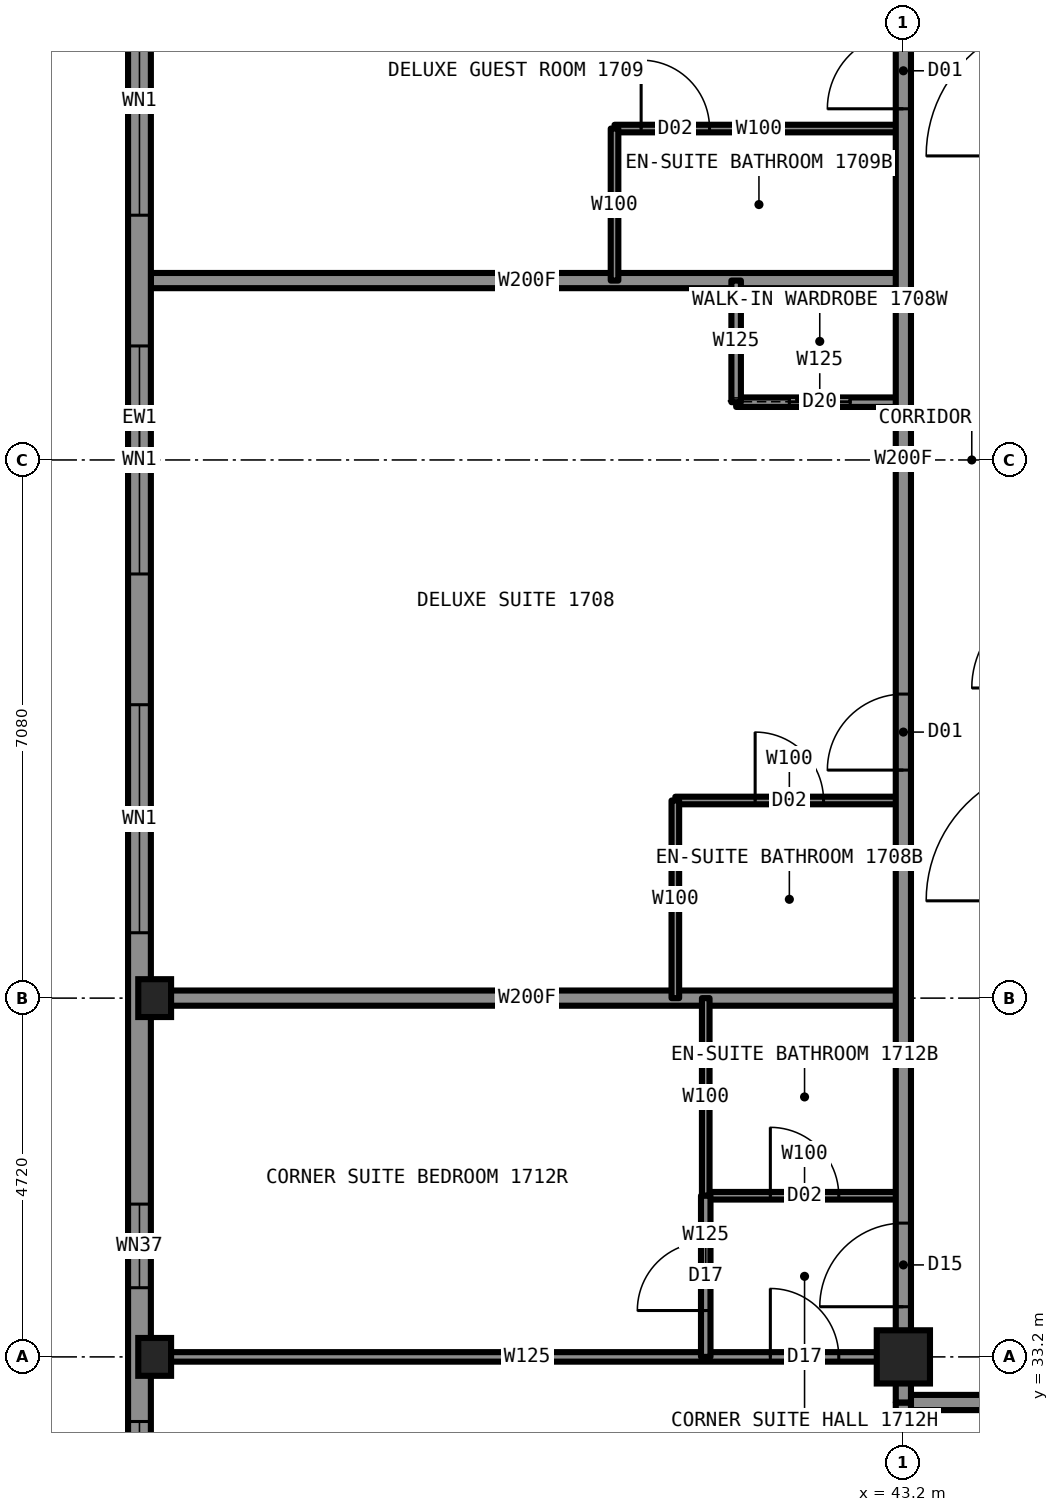
"""IFC4 building model, lengths in metres.
Left out: names, types, materials, properties, quantities, classifications, styles, units other than length and angle.
Written with IfcOpenShell. Run it as: python <this file> out.ifc"""

import sys

from ifc_helpers import new_model, si_unit, direction, frame, frame_2d, origin, origin_2d, place, context, subcontext, project, spatial, rectangle, hollow_rectangle, i_section, extrude, element, fill, save


model = new_model("IFC4")
c1 = context("Model", 3, precision=1e-05, world=origin(), true_north=direction((0.0, 1.0)))
c2 = subcontext(c1, "Body", "Model", "MODEL_VIEW")
j1 = project(units=[si_unit("LENGTHUNIT", "METRE"), si_unit("PLANEANGLEUNIT", "RADIAN")], contexts=[c1])
p1 = place(None, origin())
s1 = spatial("IfcSite", under=j1, at=p1, CompositionType="ELEMENT")
p2 = place(p1, origin())
s2 = spatial("IfcBuilding", under=s1, at=p2, CompositionType="ELEMENT")
p3 = place(p2, frame((0.0, 0.0, 60.0)))
s3 = spatial("IfcBuildingStorey", under=s2, at=p3, CompositionType="ELEMENT", Elevation=60.0)
for number, where, z_axis, x_axis in (
    (1, (33.35, 33.2, 0.0), (0.0, 0.0, 1.0), (1.0, 0.0, 0.0)),
    (2, (33.35, 37.92, 0.0), (0.0, 0.0, 1.0), (1.0, 0.0, 0.0)),
):
    element("IfcColumn", number, at=place(p3, frame(where, z_axis=z_axis, x_axis=x_axis)), inside=s3, PredefinedType="COLUMN", context=c2, shape_type="SweptSolid", body=[
        extrude(i_section(OverallWidth=0.432, OverallDepth=0.498, WebThickness=0.056, FlangeThickness=0.089, at=origin_2d()), origin(), (0.0, 0.0, 1.0), 3.5),
    ])
p4 = place(p3, frame((43.2, 33.2, 0.0), z_axis=(0.0, 0.0, 1.0), x_axis=(1.0, 0.0, 0.0)))
e3 = element("IfcColumn", 3, at=p4, inside=s3, PredefinedType="COLUMN", context=c2, shape_type="SweptSolid", body=[
    extrude(hollow_rectangle(XDim=0.7, YDim=0.7, WallThickness=0.06, at=origin_2d()), origin(), (0.0, 0.0, 1.0), 3.5),
])
p5 = place(p3, frame((33.3, 33.2, 0.0), z_axis=(0.0, 0.0, 1.0), x_axis=(1.0, 0.0, 0.0)))
e4 = element("IfcWall", 4, at=p5, inside=s3, PredefinedType="PARTITIONING", context=c2, shape_type="SweptSolid", body=[
    extrude(rectangle(XDim=9.9, YDim=0.125, at=frame_2d((4.95, 0.0))), origin(), (0.0, 0.0, 1.0), 2.573),
])
p6 = place(p5, frame((8.15, 0.0, 0.0)))
e5 = element("IfcOpeningElement", 5, at=p6, cuts=e4, PredefinedType="OPENING", context=c2, shape_type="SweptSolid", body=[
    extrude(rectangle(XDim=0.9, YDim=2.2, at=frame_2d((0.45, 1.1))), frame((0.0, 0.073, 0.0), z_axis=(0.0, -1.0, 0.0), x_axis=(1.0, 0.0, 0.0)), (0.0, 0.0, 1.0), 0.145),
])
p7 = place(p3, frame((43.2, 32.6, 0.0), z_axis=(0.0, 0.0, 1.0), x_axis=(1.0, 0.0, 0.0)))
e6 = element("IfcWall", 6, at=p7, inside=s3, PredefinedType="PARTITIONING", context=c2, shape_type="SweptSolid", body=[
    extrude(rectangle(XDim=23.6, YDim=0.2, at=frame_2d((11.8, 0.0))), origin(), (0.0, 0.0, 1.0), 3.33),
])
p8 = place(p7, frame((3.0, 0.0, 0.0)))
e7 = element("IfcOpeningElement", 7, at=p8, cuts=e6, PredefinedType="OPENING", context=c2, shape_type="SweptSolid", body=[
    extrude(rectangle(XDim=1.0, YDim=2.2, at=frame_2d((0.5, 1.1))), frame((0.0, 0.11, 0.0), z_axis=(0.0, -1.0, 0.0), x_axis=(1.0, 0.0, 0.0)), (0.0, 0.0, 1.0), 0.22),
])
p9 = place(p7, frame((12.44, 0.0, 0.0)))
e8 = element("IfcOpeningElement", 8, at=p9, cuts=e6, PredefinedType="OPENING", context=c2, shape_type="SweptSolid", body=[
    extrude(rectangle(XDim=1.0, YDim=2.2, at=frame_2d((0.5, 1.1))), frame((0.0, 0.11, 0.0), z_axis=(0.0, -1.0, 0.0), x_axis=(1.0, 0.0, 0.0)), (0.0, 0.0, 1.0), 0.22),
])
p10 = place(p7, frame((20.34, 0.0, 0.0)))
e9 = element("IfcOpeningElement", 9, at=p10, cuts=e6, PredefinedType="OPENING", context=c2, shape_type="SweptSolid", body=[
    extrude(rectangle(XDim=1.0, YDim=2.2, at=frame_2d((0.5, 1.1))), frame((0.0, 0.11, 0.0), z_axis=(0.0, -1.0, 0.0), x_axis=(1.0, 0.0, 0.0)), (0.0, 0.0, 1.0), 0.22),
])
p11 = place(p3, frame((40.2, 40.52, 0.0), z_axis=(0.0, 0.0, 1.0), x_axis=(1.0, 0.0, 0.0)))
e10 = element("IfcWall", 10, at=p11, inside=s3, PredefinedType="PARTITIONING", context=c2, shape_type="SweptSolid", body=[
    extrude(rectangle(XDim=3.0, YDim=0.1, at=frame_2d((1.5, 0.0))), origin(), (0.0, 0.0, 1.0), 3.33),
])
p12 = place(p11, frame((1.05, 0.0, 0.0)))
e11 = element("IfcOpeningElement", 11, at=p12, cuts=e10, PredefinedType="OPENING", context=c2, shape_type="SweptSolid", body=[
    extrude(rectangle(XDim=0.9, YDim=2.1, at=frame_2d((0.45, 1.05))), frame((0.0, 0.06, 0.0), z_axis=(0.0, -1.0, 0.0), x_axis=(1.0, 0.0, 0.0)), (0.0, 0.0, 1.0), 0.12),
])
p13 = place(p3, frame((33.3, 37.92, 0.0), z_axis=(0.0, 0.0, 1.0), x_axis=(1.0, 0.0, 0.0)))
e12 = element("IfcWall", 12, at=p13, inside=s3, PredefinedType="PARTITIONING", context=c2, shape_type="SweptSolid", body=[
    extrude(rectangle(XDim=9.9, YDim=0.2, at=frame_2d((4.95, 0.0))), origin(), (0.0, 0.0, 1.0), 2.573),
])
p14 = place(p3, frame((40.6, 35.32, 0.0), z_axis=(0.0, 0.0, 1.0), x_axis=(1.0, 0.0, 0.0)))
e13 = element("IfcWall", 13, at=p14, inside=s3, PredefinedType="PARTITIONING", context=c2, shape_type="SweptSolid", body=[
    extrude(rectangle(XDim=2.6, YDim=0.1, at=frame_2d((1.3, 0.0))), origin(), (0.0, 0.0, 1.0), 3.33),
])
p15 = place(p14, frame((0.85, 0.0, 0.0)))
e14 = element("IfcOpeningElement", 14, at=p15, cuts=e13, PredefinedType="OPENING", context=c2, shape_type="SweptSolid", body=[
    extrude(rectangle(XDim=0.9, YDim=2.1, at=frame_2d((0.45, 1.05))), frame((0.0, 0.06, 0.0), z_axis=(0.0, -1.0, 0.0), x_axis=(1.0, 0.0, 0.0)), (0.0, 0.0, 1.0), 0.12),
])
p16 = place(p3, frame((41.0, 45.76, 0.0), z_axis=(0.0, 0.0, 1.0), x_axis=(1.0, 0.0, 0.0)))
e15 = element("IfcWall", 15, at=p16, inside=s3, PredefinedType="PARTITIONING", context=c2, shape_type="SweptSolid", body=[
    extrude(rectangle(XDim=2.2, YDim=0.125, at=frame_2d((1.1, 0.0))), origin(), (0.0, 0.0, 1.0), 3.33),
])
p17 = place(p16, frame((0.7, 0.0, 0.0)))
e16 = element("IfcOpeningElement", 16, at=p17, cuts=e15, PredefinedType="OPENING", context=c2, shape_type="SweptSolid", body=[
    extrude(rectangle(XDim=0.8, YDim=2.1, at=frame_2d((0.4, 1.05))), frame((0.0, 0.073, 0.0), z_axis=(0.0, -1.0, 0.0), x_axis=(1.0, 0.0, 0.0)), (0.0, 0.0, 1.0), 0.145),
])
p18 = place(p3, frame((33.3, 47.36, 0.0), z_axis=(0.0, 0.0, 1.0), x_axis=(1.0, 0.0, 0.0)))
e17 = element("IfcWall", 17, at=p18, inside=s3, PredefinedType="PARTITIONING", context=c2, shape_type="SweptSolid", body=[
    extrude(rectangle(XDim=9.9, YDim=0.2, at=frame_2d((4.95, 0.0))), origin(), (0.0, 0.0, 1.0), 2.723),
])
p19 = place(p3, frame((39.4, 49.36, 0.0), z_axis=(0.0, 0.0, 1.0), x_axis=(1.0, 0.0, 0.0)))
e18 = element("IfcWall", 18, at=p19, inside=s3, PredefinedType="PARTITIONING", context=c2, shape_type="SweptSolid", body=[
    extrude(rectangle(XDim=3.8, YDim=0.1, at=frame_2d((1.9, 0.0))), origin(), (0.0, 0.0, 1.0), 3.33),
])
p20 = place(p19, frame((0.35, 0.0, 0.0)))
e19 = element("IfcOpeningElement", 19, at=p20, cuts=e18, PredefinedType="OPENING", context=c2, shape_type="SweptSolid", body=[
    extrude(rectangle(XDim=0.9, YDim=2.1, at=frame_2d((0.45, 1.05))), frame((0.0, 0.06, 0.0), z_axis=(0.0, -1.0, 0.0), x_axis=(1.0, 0.0, 0.0)), (0.0, 0.0, 1.0), 0.12),
])
p21 = place(p3, frame((43.2, 33.22, 0.0), z_axis=(0.0, 0.0, 1.0), x_axis=(0.0, 1.0, 0.0)))
e20 = element("IfcWall", 20, at=p21, inside=s3, PredefinedType="PARTITIONING", context=c2, shape_type="SweptSolid", body=[
    extrude(rectangle(XDim=23.58, YDim=0.2, at=frame_2d((11.79, 0.0))), origin(), (0.0, 0.0, 1.0), 3.33),
])
p22 = place(p21, frame((7.7, 0.0, 0.0)))
e21 = element("IfcOpeningElement", 21, at=p22, cuts=e20, PredefinedType="OPENING", context=c2, shape_type="SweptSolid", body=[
    extrude(rectangle(XDim=1.0, YDim=2.2, at=frame_2d((0.5, 1.1))), frame((0.0, 0.11, 0.0), z_axis=(0.0, -1.0, 0.0), x_axis=(1.0, 0.0, 0.0)), (0.0, 0.0, 1.0), 0.22),
])
p23 = place(p21, frame((16.4, 0.0, 0.0)))
e22 = element("IfcOpeningElement", 22, at=p23, cuts=e20, PredefinedType="OPENING", context=c2, shape_type="SweptSolid", body=[
    extrude(rectangle(XDim=1.0, YDim=2.2, at=frame_2d((0.5, 1.1))), frame((0.0, 0.11, 0.0), z_axis=(0.0, -1.0, 0.0), x_axis=(1.0, 0.0, 0.0)), (0.0, 0.0, 1.0), 0.22),
])
p24 = place(p21, frame((21.82, 0.0, 0.0)))
e23 = element("IfcOpeningElement", 23, at=p24, cuts=e20, PredefinedType="OPENING", context=c2, shape_type="SweptSolid", body=[
    extrude(rectangle(XDim=1.1, YDim=2.2, at=frame_2d((0.55, 1.1))), frame((0.0, 0.11, 0.0), z_axis=(0.0, -1.0, 0.0), x_axis=(1.0, 0.0, 0.0)), (0.0, 0.0, 1.0), 0.22),
])
p25 = place(p21, frame((0.64, 0.0, 0.0)))
e24 = element("IfcOpeningElement", 24, at=p25, cuts=e20, PredefinedType="OPENING", context=c2, shape_type="SweptSolid", body=[
    extrude(rectangle(XDim=1.1, YDim=2.2, at=frame_2d((0.55, 1.1))), frame((0.0, 0.11, 0.0), z_axis=(0.0, -1.0, 0.0), x_axis=(1.0, 0.0, 0.0)), (0.0, 0.0, 1.0), 0.22),
])
p26 = place(p3, frame((43.2, 23.3, 0.0), z_axis=(0.0, 0.0, 1.0), x_axis=(0.0, 1.0, 0.0)))
e25 = element("IfcWall", 25, at=p26, inside=s3, PredefinedType="PARTITIONING", context=c2, shape_type="SweptSolid", body=[
    extrude(rectangle(XDim=9.3, YDim=0.2, at=frame_2d((4.65, 0.0))), origin(), (0.0, 0.0, 1.0), 2.573),
])
p27 = place(p3, frame((41.0, 45.76, 0.0), z_axis=(0.0, 0.0, 1.0), x_axis=(0.0, 1.0, 0.0)))
e26 = element("IfcWall", 26, at=p27, inside=s3, PredefinedType="PARTITIONING", context=c2, shape_type="SweptSolid", body=[
    extrude(rectangle(XDim=1.6, YDim=0.125, at=frame_2d((0.8, 0.0))), origin(), (0.0, 0.0, 1.0), 3.33),
])
p28 = place(p3, frame((40.6, 35.32, 0.0), z_axis=(0.0, 0.0, 1.0), x_axis=(0.0, 1.0, 0.0)))
e27 = element("IfcWall", 27, at=p28, inside=s3, PredefinedType="PARTITIONING", context=c2, shape_type="SweptSolid", body=[
    extrude(rectangle(XDim=2.6, YDim=0.1, at=frame_2d((1.3, 0.0))), origin(), (0.0, 0.0, 1.0), 3.33),
])
p29 = place(p3, frame((40.6, 33.2, 0.0), z_axis=(0.0, 0.0, 1.0), x_axis=(0.0, 1.0, 0.0)))
e28 = element("IfcWall", 28, at=p29, inside=s3, PredefinedType="PARTITIONING", context=c2, shape_type="SweptSolid", body=[
    extrude(rectangle(XDim=2.12, YDim=0.125, at=frame_2d((1.06, 0.0))), origin(), (0.0, 0.0, 1.0), 3.33),
])
p30 = place(p29, frame((0.61, 0.0, 0.0)))
e29 = element("IfcOpeningElement", 29, at=p30, cuts=e28, PredefinedType="OPENING", context=c2, shape_type="SweptSolid", body=[
    extrude(rectangle(XDim=0.9, YDim=2.2, at=frame_2d((0.45, 1.1))), frame((0.0, 0.073, 0.0), z_axis=(0.0, -1.0, 0.0), x_axis=(1.0, 0.0, 0.0)), (0.0, 0.0, 1.0), 0.145),
])
p31 = place(p3, frame((40.2, 37.92, 0.0), z_axis=(0.0, 0.0, 1.0), x_axis=(0.0, 1.0, 0.0)))
e30 = element("IfcWall", 30, at=p31, inside=s3, PredefinedType="PARTITIONING", context=c2, shape_type="SweptSolid", body=[
    extrude(rectangle(XDim=2.6, YDim=0.1, at=frame_2d((1.3, 0.0))), origin(), (0.0, 0.0, 1.0), 3.33),
])
p32 = place(p3, frame((39.4, 47.36, 0.0), z_axis=(0.0, 0.0, 1.0), x_axis=(0.0, 1.0, 0.0)))
e31 = element("IfcWall", 31, at=p32, inside=s3, PredefinedType="PARTITIONING", context=c2, shape_type="SweptSolid", body=[
    extrude(rectangle(XDim=2.0, YDim=0.1, at=frame_2d((1.0, 0.0))), origin(), (0.0, 0.0, 1.0), 3.33),
])
p33 = place(p3, frame((33.15, 61.5, 0.0), z_axis=(0.0, 0.0, 1.0), x_axis=(0.0, -1.0, 0.0)))
e32 = element("IfcWall", 32, at=p33, inside=s3, PredefinedType="SOLIDWALL", context=c2, shape_type="SweptSolid", body=[
    extrude(rectangle(XDim=33.0, YDim=0.3, at=frame_2d((16.5, 0.0))), origin(), (0.0, 0.0, 1.0), 2.83),
])
p34 = place(p33, frame((0.85, 0.0, 0.5)))
e33 = element("IfcOpeningElement", 33, at=p34, cuts=e32, PredefinedType="OPENING", context=c2, shape_type="SweptSolid", body=[
    extrude(rectangle(XDim=3.0, YDim=2.0, at=frame_2d((1.5, 1.0))), frame((0.0, 0.16, 0.0), z_axis=(0.0, -1.0, 0.0), x_axis=(1.0, 0.0, 0.0)), (0.0, 0.0, 1.0), 0.32),
])
p35 = place(p33, frame((5.56, 0.0, 0.5)))
e34 = element("IfcOpeningElement", 34, at=p35, cuts=e32, PredefinedType="OPENING", context=c2, shape_type="SweptSolid", body=[
    extrude(rectangle(XDim=3.0, YDim=2.0, at=frame_2d((1.5, 1.0))), frame((0.0, 0.16, 0.0), z_axis=(0.0, -1.0, 0.0), x_axis=(1.0, 0.0, 0.0)), (0.0, 0.0, 1.0), 0.32),
])
p36 = place(p33, frame((10.28, 0.0, 0.5)))
e35 = element("IfcOpeningElement", 35, at=p36, cuts=e32, PredefinedType="OPENING", context=c2, shape_type="SweptSolid", body=[
    extrude(rectangle(XDim=1.2, YDim=1.7, at=frame_2d((0.6, 0.85))), frame((0.0, 0.16, 0.0), z_axis=(0.0, -1.0, 0.0), x_axis=(1.0, 0.0, 0.0)), (0.0, 0.0, 1.0), 0.32),
])
p37 = place(p33, frame((15.0, 0.0, 0.5)))
e36 = element("IfcOpeningElement", 36, at=p37, cuts=e32, PredefinedType="OPENING", context=c2, shape_type="SweptSolid", body=[
    extrude(rectangle(XDim=3.0, YDim=2.0, at=frame_2d((1.5, 1.0))), frame((0.0, 0.16, 0.0), z_axis=(0.0, -1.0, 0.0), x_axis=(1.0, 0.0, 0.0)), (0.0, 0.0, 1.0), 0.32),
])
p38 = place(p33, frame((21.52, 0.0, 0.5)))
e37 = element("IfcOpeningElement", 37, at=p38, cuts=e32, PredefinedType="OPENING", context=c2, shape_type="SweptSolid", body=[
    extrude(rectangle(XDim=1.2, YDim=1.7, at=frame_2d((0.6, 0.85))), frame((0.0, 0.16, 0.0), z_axis=(0.0, -1.0, 0.0), x_axis=(1.0, 0.0, 0.0)), (0.0, 0.0, 1.0), 0.32),
])
p39 = place(p33, frame((24.44, 0.0, 0.5)))
e38 = element("IfcOpeningElement", 38, at=p39, cuts=e32, PredefinedType="OPENING", context=c2, shape_type="SweptSolid", body=[
    extrude(rectangle(XDim=3.0, YDim=2.0, at=frame_2d((1.5, 1.0))), frame((0.0, 0.16, 0.0), z_axis=(0.0, -1.0, 0.0), x_axis=(1.0, 0.0, 0.0)), (0.0, 0.0, 1.0), 0.32),
])
p40 = place(p33, frame((29.15, 0.0, 0.5)))
e39 = element("IfcOpeningElement", 39, at=p40, cuts=e32, PredefinedType="OPENING", context=c2, shape_type="SweptSolid", body=[
    extrude(rectangle(XDim=3.0, YDim=2.0, at=frame_2d((1.5, 1.0))), frame((0.0, 0.16, 0.0), z_axis=(0.0, -1.0, 0.0), x_axis=(1.0, 0.0, 0.0)), (0.0, 0.0, 1.0), 0.32),
])
p41 = place(p33, frame((11.48, 0.0, 0.5)))
e40 = element("IfcOpeningElement", 40, at=p41, cuts=e32, PredefinedType="OPENING", context=c2, shape_type="SweptSolid", body=[
    extrude(rectangle(XDim=0.6, YDim=0.8, at=frame_2d((0.3, 0.4))), frame((0.0, 0.16, 0.0), z_axis=(0.0, -1.0, 0.0), x_axis=(1.0, 0.0, 0.0)), (0.0, 0.0, 1.0), 0.32),
])
p42 = place(p33, frame((20.87, 0.0, 0.5)))
e41 = element("IfcOpeningElement", 41, at=p42, cuts=e32, PredefinedType="OPENING", context=c2, shape_type="SweptSolid", body=[
    extrude(rectangle(XDim=0.6, YDim=0.8, at=frame_2d((0.3, 0.4))), frame((0.0, 0.16, 0.0), z_axis=(0.0, -1.0, 0.0), x_axis=(1.0, 0.0, 0.0)), (0.0, 0.0, 1.0), 0.32),
])
p43 = place(p3, frame((43.2, 32.6, 0.0), z_axis=(0.0, 0.0, 1.0), x_axis=(0.0, 1.0, 0.0)))
e42 = element("IfcWall", 42, at=p43, inside=s3, PredefinedType="PARTITIONING", context=c2, shape_type="SweptSolid", body=[
    extrude(rectangle(XDim=0.62, YDim=0.2, at=frame_2d((0.31, 0.0))), origin(), (0.0, 0.0, 1.0), 2.573),
])
p44 = place(p22, origin())
e43 = element("IfcDoor", 43, at=p44, inside=s3, OperationType="SINGLE_SWING_LEFT", PredefinedType="DOOR", context=c2, shape_type="SweptSolid", body=[
    extrude(rectangle(XDim=1.0, YDim=2.2, at=frame_2d((0.5, 1.1))), frame((0.0, 0.025, 0.0), z_axis=(0.0, -1.0, 0.0), x_axis=(1.0, 0.0, 0.0)), (0.0, 0.0, 1.0), 0.05),
])
fill(e21, e43)
p45 = place(p12, origin())
e44 = element("IfcDoor", 44, at=p45, inside=s3, OperationType="SINGLE_SWING_RIGHT", PredefinedType="DOOR", context=c2, shape_type="SweptSolid", body=[
    extrude(rectangle(XDim=0.9, YDim=2.1, at=frame_2d((0.45, 1.05))), frame((0.0, 0.025, 0.0), z_axis=(0.0, -1.0, 0.0), x_axis=(1.0, 0.0, 0.0)), (0.0, 0.0, 1.0), 0.05),
])
fill(e11, e44)
p46 = place(p17, origin())
e45 = element("IfcDoor", 45, at=p46, inside=s3, OperationType="SLIDING_TO_LEFT", PredefinedType="DOOR", context=c2, shape_type="SweptSolid", body=[
    extrude(rectangle(XDim=0.8, YDim=2.1, at=frame_2d((0.4, 1.05))), frame((0.0, 0.025, 0.0), z_axis=(0.0, -1.0, 0.0), x_axis=(1.0, 0.0, 0.0)), (0.0, 0.0, 1.0), 0.05),
])
fill(e16, e45)
p47 = place(p23, origin())
e46 = element("IfcDoor", 46, at=p47, inside=s3, OperationType="SINGLE_SWING_LEFT", PredefinedType="DOOR", context=c2, shape_type="SweptSolid", body=[
    extrude(rectangle(XDim=1.0, YDim=2.2, at=frame_2d((0.5, 1.1))), frame((0.0, 0.025, 0.0), z_axis=(0.0, -1.0, 0.0), x_axis=(1.0, 0.0, 0.0)), (0.0, 0.0, 1.0), 0.05),
])
fill(e22, e46)
p48 = place(p20, origin())
e47 = element("IfcDoor", 47, at=p48, inside=s3, OperationType="SINGLE_SWING_RIGHT", PredefinedType="DOOR", context=c2, shape_type="SweptSolid", body=[
    extrude(rectangle(XDim=0.9, YDim=2.1, at=frame_2d((0.45, 1.05))), frame((0.0, 0.025, 0.0), z_axis=(0.0, -1.0, 0.0), x_axis=(1.0, 0.0, 0.0)), (0.0, 0.0, 1.0), 0.05),
])
fill(e19, e47)
p49 = place(p6, origin())
e48 = element("IfcDoor", 48, at=p49, inside=s3, OperationType="SINGLE_SWING_LEFT", PredefinedType="DOOR", context=c2, shape_type="SweptSolid", body=[
    extrude(rectangle(XDim=0.9, YDim=2.2, at=frame_2d((0.45, 1.1))), frame((0.0, 0.025, 0.0), z_axis=(0.0, -1.0, 0.0), x_axis=(1.0, 0.0, 0.0)), (0.0, 0.0, 1.0), 0.05),
])
fill(e5, e48)
p50 = place(p15, origin())
e49 = element("IfcDoor", 49, at=p50, inside=s3, OperationType="SINGLE_SWING_RIGHT", PredefinedType="DOOR", context=c2, shape_type="SweptSolid", body=[
    extrude(rectangle(XDim=0.9, YDim=2.1, at=frame_2d((0.45, 1.05))), frame((0.0, 0.025, 0.0), z_axis=(0.0, -1.0, 0.0), x_axis=(1.0, 0.0, 0.0)), (0.0, 0.0, 1.0), 0.05),
])
fill(e14, e49)
p51 = place(p25, origin())
e50 = element("IfcDoor", 50, at=p51, inside=s3, OperationType="SINGLE_SWING_LEFT", PredefinedType="DOOR", context=c2, shape_type="SweptSolid", body=[
    extrude(rectangle(XDim=1.1, YDim=2.2, at=frame_2d((0.55, 1.1))), frame((0.0, 0.025, 0.0), z_axis=(0.0, -1.0, 0.0), x_axis=(1.0, 0.0, 0.0)), (0.0, 0.0, 1.0), 0.05),
])
fill(e24, e50)
p52 = place(p30, origin())
e51 = element("IfcDoor", 51, at=p52, inside=s3, OperationType="SINGLE_SWING_LEFT", PredefinedType="DOOR", context=c2, shape_type="SweptSolid", body=[
    extrude(rectangle(XDim=0.9, YDim=2.2, at=frame_2d((0.45, 1.1))), frame((0.0, 0.025, 0.0), z_axis=(0.0, -1.0, 0.0), x_axis=(1.0, 0.0, 0.0)), (0.0, 0.0, 1.0), 0.05),
])
fill(e29, e51)
p53 = place(p36, origin())
e52 = element("IfcWindow", 52, at=p53, inside=s3, PartitioningType="SINGLE_PANEL", PredefinedType="WINDOW", context=c2, shape_type="SweptSolid", body=[
    extrude(rectangle(XDim=1.2, YDim=1.7, at=frame_2d((0.6, 0.85))), frame((0.0, 0.03, 0.0), z_axis=(0.0, -1.0, 0.0), x_axis=(1.0, 0.0, 0.0)), (0.0, 0.0, 1.0), 0.06),
])
fill(e35, e52)
p54 = place(p37, origin())
e53 = element("IfcWindow", 53, at=p54, inside=s3, PartitioningType="SINGLE_PANEL", PredefinedType="WINDOW", context=c2, shape_type="SweptSolid", body=[
    extrude(rectangle(XDim=3.0, YDim=2.0, at=frame_2d((1.5, 1.0))), frame((0.0, 0.03, 0.0), z_axis=(0.0, -1.0, 0.0), x_axis=(1.0, 0.0, 0.0)), (0.0, 0.0, 1.0), 0.06),
])
fill(e36, e53)
p55 = place(p38, origin())
e54 = element("IfcWindow", 54, at=p55, inside=s3, PartitioningType="SINGLE_PANEL", PredefinedType="WINDOW", context=c2, shape_type="SweptSolid", body=[
    extrude(rectangle(XDim=1.2, YDim=1.7, at=frame_2d((0.6, 0.85))), frame((0.0, 0.03, 0.0), z_axis=(0.0, -1.0, 0.0), x_axis=(1.0, 0.0, 0.0)), (0.0, 0.0, 1.0), 0.06),
])
fill(e37, e54)
p56 = place(p39, origin())
e55 = element("IfcWindow", 55, at=p56, inside=s3, PartitioningType="SINGLE_PANEL", PredefinedType="WINDOW", context=c2, shape_type="SweptSolid", body=[
    extrude(rectangle(XDim=3.0, YDim=2.0, at=frame_2d((1.5, 1.0))), frame((0.0, 0.03, 0.0), z_axis=(0.0, -1.0, 0.0), x_axis=(1.0, 0.0, 0.0)), (0.0, 0.0, 1.0), 0.06),
])
fill(e38, e55)
p57 = place(p40, origin())
e56 = element("IfcWindow", 56, at=p57, inside=s3, PartitioningType="SINGLE_PANEL", PredefinedType="WINDOW", context=c2, shape_type="SweptSolid", body=[
    extrude(rectangle(XDim=3.0, YDim=2.0, at=frame_2d((1.5, 1.0))), frame((0.0, 0.03, 0.0), z_axis=(0.0, -1.0, 0.0), x_axis=(1.0, 0.0, 0.0)), (0.0, 0.0, 1.0), 0.06),
])
fill(e39, e56)
p58 = place(p41, origin())
e57 = element("IfcWindow", 57, at=p58, inside=s3, PartitioningType="SINGLE_PANEL", PredefinedType="WINDOW", context=c2, shape_type="SweptSolid", body=[
    extrude(rectangle(XDim=0.6, YDim=0.8, at=frame_2d((0.3, 0.4))), frame((0.0, 0.03, 0.0), z_axis=(0.0, -1.0, 0.0), x_axis=(1.0, 0.0, 0.0)), (0.0, 0.0, 1.0), 0.06),
])
fill(e40, e57)
p59 = place(p42, origin())
e58 = element("IfcWindow", 58, at=p59, inside=s3, PartitioningType="SINGLE_PANEL", PredefinedType="WINDOW", context=c2, shape_type="SweptSolid", body=[
    extrude(rectangle(XDim=0.6, YDim=0.8, at=frame_2d((0.3, 0.4))), frame((0.0, 0.03, 0.0), z_axis=(0.0, -1.0, 0.0), x_axis=(1.0, 0.0, 0.0)), (0.0, 0.0, 1.0), 0.06),
])
fill(e41, e58)
save(model, sys.argv[1])
